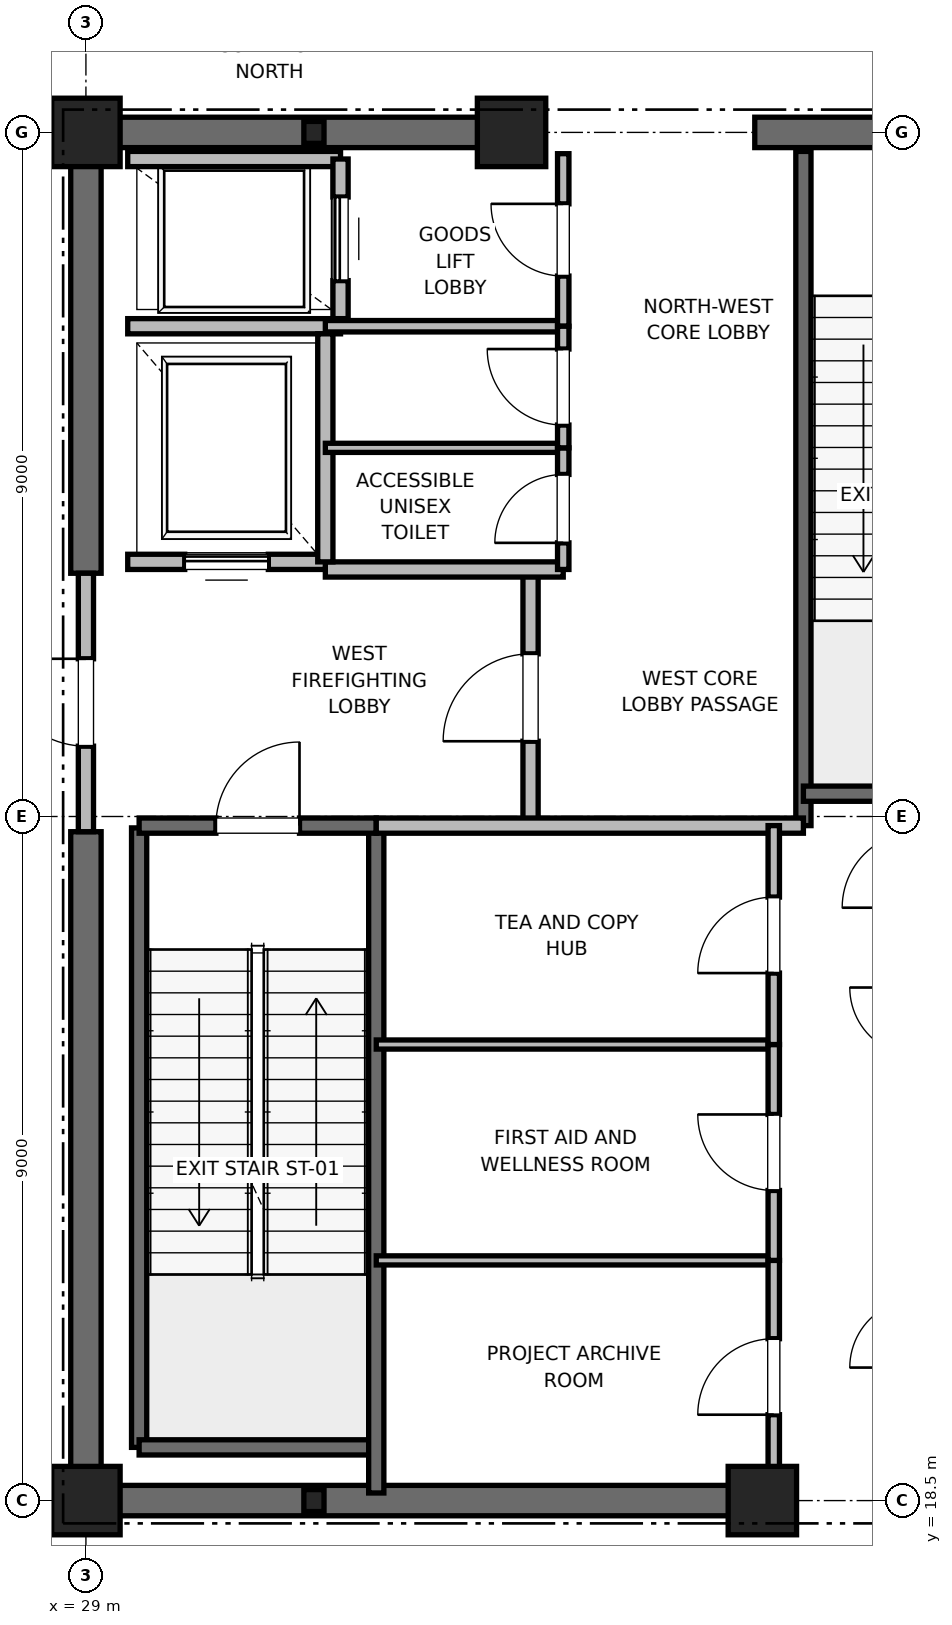
"""IFC4 building model, lengths in metres.
Left out: names, types, materials, properties, quantities, classifications, styles, units other than length and angle.
Written with IfcOpenShell. Run it as: python <this file> out.ifc"""

import sys

from ifc_helpers import new_model, si_unit, direction, frame, frame_2d, origin, origin_2d, place, context, subcontext, project, spatial, rectangle, i_section, extrude, element, fill, save


model = new_model("IFC4")
c1 = context("Model", 3, precision=1e-05, world=origin(), true_north=direction((0.0, 1.0)))
c2 = subcontext(c1, "Body", "Model", "MODEL_VIEW")
j1 = project(units=[si_unit("LENGTHUNIT", "METRE"), si_unit("PLANEANGLEUNIT", "RADIAN")], contexts=[c1])
p1 = place(None, origin())
s1 = spatial("IfcSite", under=j1, at=p1, CompositionType="ELEMENT")
p2 = place(p1, origin())
s2 = spatial("IfcBuilding", under=s1, at=p2, CompositionType="ELEMENT")
p3 = place(p2, frame((0.0, 0.0, 348.8)))
s3 = spatial("IfcBuildingStorey", under=s2, at=p3, CompositionType="ELEMENT", Elevation=348.8)
for number, where, z_axis, x_axis in (
    (1, (29.0, 18.5, 0.0), (0.0, 0.0, 1.0), (1.0, 0.0, 0.0)),
    (2, (29.0, 36.5, 0.0), (0.0, 0.0, 1.0), (1.0, 0.0, 0.0)),
    (3, (37.9, 18.5, 0.0), (0.0, 0.0, 1.0), (1.0, 0.0, 0.0)),
    (4, (34.6, 36.5, 0.0), (0.0, 0.0, 1.0), (1.0, 0.0, 0.0)),
):
    element("IfcColumn", number, at=place(p3, frame(where, z_axis=z_axis, x_axis=x_axis)), inside=s3, PredefinedType="PILASTER", context=c2, shape_type="SweptSolid", body=[
        extrude(rectangle(XDim=0.9, YDim=0.9, at=origin_2d()), origin(), (0.0, 0.0, 1.0), 5.5),
    ])
for number, where, z_axis, x_axis in (
    (5, (32.0, 18.5, 0.0), (0.0, 0.0, 1.0), (1.0, 0.0, 0.0)),
    (6, (32.0, 36.5, 0.0), (0.0, 0.0, 1.0), (1.0, 0.0, 0.0)),
):
    element("IfcColumn", number, at=place(p3, frame(where, z_axis=z_axis, x_axis=x_axis)), inside=s3, PredefinedType="COLUMN", context=c2, shape_type="SweptSolid", body=[
        extrude(i_section(OverallWidth=0.265, OverallDepth=0.289, WebThickness=0.019, FlangeThickness=0.032, FilletRadius=0.013, at=origin_2d()), origin(), (0.0, 0.0, 1.0), 5.5),
    ])
p4 = place(p3, frame((29.0, 18.5, 0.0), z_axis=(0.0, 0.0, 1.0), x_axis=(1.0, 0.0, 0.0)))
e7 = element("IfcWall", 7, at=p4, inside=s3, PredefinedType="SHEAR", context=c2, shape_type="SweptSolid", body=[
    extrude(rectangle(XDim=9.2, YDim=0.4, at=frame_2d((4.6, 0.0))), origin(), (0.0, 0.0, 1.0), 5.2),
])
p5 = place(p3, frame((29.0, 36.5, 0.0), z_axis=(0.0, 0.0, 1.0), x_axis=(1.0, 0.0, 0.0)))
e8 = element("IfcWall", 8, at=p5, inside=s3, PredefinedType="SHEAR", context=c2, shape_type="SweptSolid", body=[
    extrude(rectangle(XDim=5.8, YDim=0.4, at=frame_2d((2.9, 0.0))), origin(), (0.0, 0.0, 1.0), 5.2),
])
p6 = place(p3, frame((37.8, 36.5, 0.0), z_axis=(0.0, 0.0, 1.0), x_axis=(1.0, 0.0, 0.0)))
e9 = element("IfcWall", 9, at=p6, inside=s3, PredefinedType="SHEAR", context=c2, shape_type="SweptSolid", body=[
    extrude(rectangle(XDim=4.4, YDim=0.4, at=frame_2d((2.2, 0.0))), origin(), (0.0, 0.0, 1.0), 5.2),
])
p7 = place(p6, frame((1.65, 0.0, 0.0)))
e10 = element("IfcOpeningElement", 10, at=p7, cuts=e9, PredefinedType="OPENING", context=c2, shape_type="SweptSolid", body=[
    extrude(rectangle(XDim=1.1, YDim=2.15, at=frame_2d((0.55, 1.075))), frame((0.0, 0.2, 0.0), z_axis=(0.0, -1.0, 0.0), x_axis=(1.0, 0.0, 0.0)), (0.0, 0.0, 1.0), 0.4),
])
p8 = place(p3, frame((29.0, 18.5, 0.0), z_axis=(0.0, 0.0, 1.0), x_axis=(0.0, 1.0, 0.0)))
e11 = element("IfcWall", 11, at=p8, inside=s3, PredefinedType="SHEAR", context=c2, shape_type="SweptSolid", body=[
    extrude(rectangle(XDim=8.8, YDim=0.4, at=frame_2d((4.4, 0.0))), origin(), (0.0, 0.0, 1.0), 5.2),
])
p9 = place(p3, frame((29.0, 30.7, 0.0), z_axis=(0.0, 0.0, 1.0), x_axis=(0.0, 1.0, 0.0)))
e12 = element("IfcWall", 12, at=p9, inside=s3, PredefinedType="SHEAR", context=c2, shape_type="SweptSolid", body=[
    extrude(rectangle(XDim=5.8, YDim=0.4, at=frame_2d((2.9, 0.0))), origin(), (0.0, 0.0, 1.0), 5.2),
])
p10 = place(p3, frame((29.7, 19.2, 0.0), z_axis=(0.0, 0.0, 1.0), x_axis=(0.0, 1.0, 0.0)))
e13 = element("IfcWall", 13, at=p10, inside=s3, PredefinedType="SOLIDWALL", context=c2, shape_type="SweptSolid", body=[
    extrude(rectangle(XDim=8.15, YDim=0.2, at=frame_2d((4.075, 0.0))), origin(), (0.0, 0.0, 1.0), 5.2),
])
p11 = place(p3, frame((29.7, 19.2, 0.0), z_axis=(0.0, 0.0, 1.0), x_axis=(1.0, 0.0, 0.0)))
e14 = element("IfcWall", 14, at=p11, inside=s3, PredefinedType="SOLIDWALL", context=c2, shape_type="SweptSolid", body=[
    extrude(rectangle(XDim=3.12, YDim=0.2, at=frame_2d((1.56, 0.0))), origin(), (0.0, 0.0, 1.0), 5.2),
])
p12 = place(p3, frame((32.82, 18.6, 0.0), z_axis=(0.0, 0.0, 1.0), x_axis=(0.0, 1.0, 0.0)))
e15 = element("IfcWall", 15, at=p12, inside=s3, PredefinedType="SOLIDWALL", context=c2, shape_type="SweptSolid", body=[
    extrude(rectangle(XDim=8.78, YDim=0.2, at=frame_2d((4.39, 0.0))), origin(), (0.0, 0.0, 1.0), 5.2),
])
p13 = place(p3, frame((29.7, 27.38, 0.0), z_axis=(0.0, 0.0, 1.0), x_axis=(1.0, 0.0, 0.0)))
e16 = element("IfcWall", 16, at=p13, inside=s3, PredefinedType="SOLIDWALL", context=c2, shape_type="SweptSolid", body=[
    extrude(rectangle(XDim=3.12, YDim=0.2, at=frame_2d((1.56, 0.0))), origin(), (0.0, 0.0, 1.0), 5.2),
])
p14 = place(p13, frame((1.01, 0.0, 0.0)))
e17 = element("IfcOpeningElement", 17, at=p14, cuts=e16, PredefinedType="OPENING", context=c2, shape_type="SweptSolid", body=[
    extrude(rectangle(XDim=1.1, YDim=2.15, at=frame_2d((0.55, 1.075))), frame((0.0, 0.1, 0.0), z_axis=(0.0, -1.0, 0.0), x_axis=(1.0, 0.0, 0.0)), (0.0, 0.0, 1.0), 0.2),
])
p15 = place(p3, frame((38.44, 27.38, 0.0), z_axis=(0.0, 0.0, 1.0), x_axis=(0.0, 1.0, 0.0)))
e18 = element("IfcWall", 18, at=p15, inside=s3, PredefinedType="SOLIDWALL", context=c2, shape_type="SweptSolid", body=[
    extrude(rectangle(XDim=8.87, YDim=0.2, at=frame_2d((4.435, 0.0))), origin(), (0.0, 0.0, 1.0), 5.2),
])
p16 = place(p3, frame((38.44, 27.8, 0.0), z_axis=(0.0, 0.0, 1.0), x_axis=(1.0, 0.0, 0.0)))
e19 = element("IfcWall", 19, at=p16, inside=s3, PredefinedType="SOLIDWALL", context=c2, shape_type="SweptSolid", body=[
    extrude(rectangle(XDim=3.32, YDim=0.2, at=frame_2d((1.66, 0.0))), origin(), (0.0, 0.0, 1.0), 5.2),
])
p17 = place(p3, frame((34.85, 27.38, 0.0), z_axis=(0.0, 0.0, 1.0), x_axis=(0.0, 1.0, 0.0)))
e20 = element("IfcWall", 20, at=p17, inside=s3, PredefinedType="PARTITIONING", context=c2, shape_type="SweptSolid", body=[
    extrude(rectangle(XDim=3.37, YDim=0.2, at=frame_2d((1.685, 0.0))), origin(), (0.0, 0.0, 1.0), 5.2),
])
p18 = place(p17, frame((1.11, 0.0, 0.0)))
e21 = element("IfcOpeningElement", 21, at=p18, cuts=e20, PredefinedType="OPENING", context=c2, shape_type="SweptSolid", body=[
    extrude(rectangle(XDim=1.15, YDim=2.2, at=frame_2d((0.575, 1.1))), frame((0.0, 0.1, 0.0), z_axis=(0.0, -1.0, 0.0), x_axis=(1.0, 0.0, 0.0)), (0.0, 0.0, 1.0), 0.2),
])
p19 = place(p3, frame((29.0, 27.3, 0.0), z_axis=(0.0, 0.0, 1.0), x_axis=(0.0, 1.0, 0.0)))
e22 = element("IfcWall", 22, at=p19, inside=s3, PredefinedType="PARTITIONING", context=c2, shape_type="SweptSolid", body=[
    extrude(rectangle(XDim=3.4, YDim=0.2, at=frame_2d((1.7, 0.0))), origin(), (0.0, 0.0, 1.0), 4.28),
])
p20 = place(p19, frame((1.125, 0.0, 0.0)))
e23 = element("IfcOpeningElement", 23, at=p20, cuts=e22, PredefinedType="OPENING", context=c2, shape_type="SweptSolid", body=[
    extrude(rectangle(XDim=1.15, YDim=2.2, at=frame_2d((0.575, 1.1))), frame((0.0, 0.1, 0.0), z_axis=(0.0, -1.0, 0.0), x_axis=(1.0, 0.0, 0.0)), (0.0, 0.0, 1.0), 0.2),
])
p21 = place(p3, frame((32.82, 27.38, 0.0), z_axis=(0.0, 0.0, 1.0), x_axis=(1.0, 0.0, 0.0)))
e24 = element("IfcWall", 24, at=p21, inside=s3, PredefinedType="PARTITIONING", context=c2, shape_type="SweptSolid", body=[
    extrude(rectangle(XDim=5.62, YDim=0.2, at=frame_2d((2.81, 0.0))), origin(), (0.0, 0.0, 1.0), 5.2),
])
p22 = place(p3, frame((32.15, 30.75, 0.0), z_axis=(0.0, 0.0, 1.0), x_axis=(1.0, 0.0, 0.0)))
e25 = element("IfcWall", 25, at=p22, inside=s3, PredefinedType="PARTITIONING", context=c2, shape_type="SweptSolid", body=[
    extrude(rectangle(XDim=3.13, YDim=0.2, at=frame_2d((1.565, 0.0))), origin(), (0.0, 0.0, 1.0), 5.2),
])
p23 = place(p3, frame((29.55, 30.85, 0.0), z_axis=(0.0, 0.0, 1.0), x_axis=(1.0, 0.0, 0.0)))
e26 = element("IfcWall", 26, at=p23, inside=s3, PredefinedType="SOLIDWALL", context=c2, shape_type="SweptSolid", body=[
    extrude(rectangle(XDim=2.6, YDim=0.2, at=frame_2d((1.3, 0.0))), origin(), (0.0, 0.0, 1.0), 4.28),
])
p24 = place(p23, frame((0.75, 0.0, 0.0)))
e27 = element("IfcOpeningElement", 27, at=p24, cuts=e26, PredefinedType="OPENING", context=c2, shape_type="SweptSolid", body=[
    extrude(rectangle(XDim=1.1, YDim=2.2, at=frame_2d((0.55, 1.1))), frame((0.0, 0.1, 0.0), z_axis=(0.0, -1.0, 0.0), x_axis=(1.0, 0.0, 0.0)), (0.0, 0.0, 1.0), 0.2),
])
p25 = place(p3, frame((29.55, 33.95, 0.0), z_axis=(0.0, 0.0, 1.0), x_axis=(1.0, 0.0, 0.0)))
e28 = element("IfcWall", 28, at=p25, inside=s3, PredefinedType="SOLIDWALL", context=c2, shape_type="SweptSolid", body=[
    extrude(rectangle(XDim=2.8, YDim=0.2, at=frame_2d((1.4, 0.0))), origin(), (0.0, 0.0, 1.0), 5.2),
])
p26 = place(p3, frame((32.15, 30.85, 0.0), z_axis=(0.0, 0.0, 1.0), x_axis=(0.0, 1.0, 0.0)))
e29 = element("IfcWall", 29, at=p26, inside=s3, PredefinedType="SOLIDWALL", context=c2, shape_type="SweptSolid", body=[
    extrude(rectangle(XDim=3.0, YDim=0.2, at=frame_2d((1.5, 0.0))), origin(), (0.0, 0.0, 1.0), 5.2),
])
p27 = place(p3, frame((32.35, 36.15, 0.0), z_axis=(0.0, 0.0, 1.0), x_axis=(-1.0, 0.0, 0.0)))
e30 = element("IfcWall", 30, at=p27, inside=s3, PredefinedType="SOLIDWALL", context=c2, shape_type="SweptSolid", body=[
    extrude(rectangle(XDim=2.8, YDim=0.2, at=frame_2d((1.4, 0.0))), origin(), (0.0, 0.0, 1.0), 4.635),
])
p28 = place(p3, frame((32.35, 34.05, 0.0), z_axis=(0.0, 0.0, 1.0), x_axis=(0.0, 1.0, 0.0)))
e31 = element("IfcWall", 31, at=p28, inside=s3, PredefinedType="SOLIDWALL", context=c2, shape_type="SweptSolid", body=[
    extrude(rectangle(XDim=2.1, YDim=0.2, at=frame_2d((1.05, 0.0))), origin(), (0.0, 0.0, 1.0), 5.2),
])
p29 = place(p28, frame((0.5, 0.0, 0.0)))
e32 = element("IfcOpeningElement", 32, at=p29, cuts=e31, PredefinedType="OPENING", context=c2, shape_type="SweptSolid", body=[
    extrude(rectangle(XDim=1.1, YDim=2.2, at=frame_2d((0.55, 1.1))), frame((0.0, 0.1, 0.0), z_axis=(0.0, -1.0, 0.0), x_axis=(1.0, 0.0, 0.0)), (0.0, 0.0, 1.0), 0.2),
])
p30 = place(p3, frame((32.15, 33.95, 0.0), z_axis=(0.0, 0.0, 1.0), x_axis=(1.0, 0.0, 0.0)))
e33 = element("IfcWall", 33, at=p30, inside=s3, PredefinedType="PARTITIONING", context=c2, shape_type="SweptSolid", body=[
    extrude(rectangle(XDim=3.13, YDim=0.15, at=frame_2d((1.565, 0.0))), origin(), (0.0, 0.0, 1.0), 2.85),
])
p31 = place(p3, frame((35.28, 33.95, 0.0), z_axis=(0.0, 0.0, 1.0), x_axis=(0.0, 1.0, 0.0)))
e34 = element("IfcWall", 34, at=p31, inside=s3, PredefinedType="PARTITIONING", context=c2, shape_type="SweptSolid", body=[
    extrude(rectangle(XDim=2.27, YDim=0.15, at=frame_2d((1.135, 0.0))), origin(), (0.0, 0.0, 1.0), 2.85),
])
p32 = place(p31, frame((0.66, 0.0, 0.0)))
e35 = element("IfcOpeningElement", 35, at=p32, cuts=e34, PredefinedType="OPENING", context=c2, shape_type="SweptSolid", body=[
    extrude(rectangle(XDim=0.95, YDim=2.15, at=frame_2d((0.475, 1.075))), frame((0.0, 0.075, 0.0), z_axis=(0.0, -1.0, 0.0), x_axis=(1.0, 0.0, 0.0)), (0.0, 0.0, 1.0), 0.15),
])
p33 = place(p3, frame((32.15, 32.35, 0.0), z_axis=(0.0, 0.0, 1.0), x_axis=(1.0, 0.0, 0.0)))
e36 = element("IfcWall", 36, at=p33, inside=s3, PredefinedType="PARTITIONING", context=c2, shape_type="SweptSolid", body=[
    extrude(rectangle(XDim=3.13, YDim=0.12, at=frame_2d((1.565, 0.0))), origin(), (0.0, 0.0, 1.0), 2.85),
])
p34 = place(p3, frame((35.28, 30.75, 0.0), z_axis=(0.0, 0.0, 1.0), x_axis=(0.0, 1.0, 0.0)))
e37 = element("IfcWall", 37, at=p34, inside=s3, PredefinedType="PARTITIONING", context=c2, shape_type="SweptSolid", body=[
    extrude(rectangle(XDim=1.6, YDim=0.15, at=frame_2d((0.8, 0.0))), origin(), (0.0, 0.0, 1.0), 2.85),
])
p35 = place(p34, frame((0.35, 0.0, 0.0)))
e38 = element("IfcOpeningElement", 38, at=p35, cuts=e37, PredefinedType="OPENING", context=c2, shape_type="SweptSolid", body=[
    extrude(rectangle(XDim=0.9, YDim=2.1, at=frame_2d((0.45, 1.05))), frame((0.0, 0.075, 0.0), z_axis=(0.0, -1.0, 0.0), x_axis=(1.0, 0.0, 0.0)), (0.0, 0.0, 1.0), 0.15),
])
p36 = place(p3, frame((35.28, 32.35, 0.0), z_axis=(0.0, 0.0, 1.0), x_axis=(0.0, 1.0, 0.0)))
e39 = element("IfcWall", 39, at=p36, inside=s3, PredefinedType="PARTITIONING", context=c2, shape_type="SweptSolid", body=[
    extrude(rectangle(XDim=1.6, YDim=0.15, at=frame_2d((0.8, 0.0))), origin(), (0.0, 0.0, 1.0), 2.85),
])
p37 = place(p36, frame((0.3, 0.0, 0.0)))
e40 = element("IfcOpeningElement", 40, at=p37, cuts=e39, PredefinedType="OPENING", context=c2, shape_type="SweptSolid", body=[
    extrude(rectangle(XDim=1.0, YDim=2.15, at=frame_2d((0.5, 1.075))), frame((0.0, 0.075, 0.0), z_axis=(0.0, -1.0, 0.0), x_axis=(1.0, 0.0, 0.0)), (0.0, 0.0, 1.0), 0.15),
])
for number, where, z_axis, x_axis in (
    (41, (32.82, 21.66, 0.0), (0.0, 0.0, 1.0), (1.0, 0.0, 0.0)),
    (42, (32.82, 24.5, 0.0), (0.0, 0.0, 1.0), (1.0, 0.0, 0.0)),
):
    element("IfcWall", number, at=place(p3, frame(where, z_axis=z_axis, x_axis=x_axis)), inside=s3, PredefinedType="PARTITIONING", context=c2, shape_type="SweptSolid", body=[
        extrude(rectangle(XDim=5.23, YDim=0.12, at=frame_2d((2.615, 0.0))), origin(), (0.0, 0.0, 1.0), 2.85),
    ])
p38 = place(p3, frame((38.05, 18.6, 0.0), z_axis=(0.0, 0.0, 1.0), x_axis=(0.0, 1.0, 0.0)))
e43 = element("IfcWall", 43, at=p38, inside=s3, PredefinedType="PARTITIONING", context=c2, shape_type="SweptSolid", body=[
    extrude(rectangle(XDim=3.06, YDim=0.15, at=frame_2d((1.53, 0.0))), origin(), (0.0, 0.0, 1.0), 2.85),
])
p39 = place(p38, frame((1.03, 0.0, 0.0)))
e44 = element("IfcOpeningElement", 44, at=p39, cuts=e43, PredefinedType="OPENING", context=c2, shape_type="SweptSolid", body=[
    extrude(rectangle(XDim=1.0, YDim=2.15, at=frame_2d((0.5, 1.075))), frame((0.0, 0.075, 0.0), z_axis=(0.0, -1.0, 0.0), x_axis=(1.0, 0.0, 0.0)), (0.0, 0.0, 1.0), 0.15),
])
p40 = place(p3, frame((38.05, 21.66, 0.0), z_axis=(0.0, 0.0, 1.0), x_axis=(0.0, 1.0, 0.0)))
e45 = element("IfcWall", 45, at=p40, inside=s3, PredefinedType="PARTITIONING", context=c2, shape_type="SweptSolid", body=[
    extrude(rectangle(XDim=2.84, YDim=0.15, at=frame_2d((1.42, 0.0))), origin(), (0.0, 0.0, 1.0), 2.85),
])
p41 = place(p40, frame((0.92, 0.0, 0.0)))
e46 = element("IfcOpeningElement", 46, at=p41, cuts=e45, PredefinedType="OPENING", context=c2, shape_type="SweptSolid", body=[
    extrude(rectangle(XDim=1.0, YDim=2.15, at=frame_2d((0.5, 1.075))), frame((0.0, 0.075, 0.0), z_axis=(0.0, -1.0, 0.0), x_axis=(1.0, 0.0, 0.0)), (0.0, 0.0, 1.0), 0.15),
])
p42 = place(p3, frame((38.05, 24.5, 0.0), z_axis=(0.0, 0.0, 1.0), x_axis=(0.0, 1.0, 0.0)))
e47 = element("IfcWall", 47, at=p42, inside=s3, PredefinedType="PARTITIONING", context=c2, shape_type="SweptSolid", body=[
    extrude(rectangle(XDim=2.88, YDim=0.15, at=frame_2d((1.44, 0.0))), origin(), (0.0, 0.0, 1.0), 2.85),
])
p43 = place(p42, frame((0.94, 0.0, 0.0)))
e48 = element("IfcOpeningElement", 48, at=p43, cuts=e47, PredefinedType="OPENING", context=c2, shape_type="SweptSolid", body=[
    extrude(rectangle(XDim=1.0, YDim=2.15, at=frame_2d((0.5, 1.075))), frame((0.0, 0.075, 0.0), z_axis=(0.0, -1.0, 0.0), x_axis=(1.0, 0.0, 0.0)), (0.0, 0.0, 1.0), 0.15),
])
p44 = place(p14, origin())
e49 = element("IfcDoor", 49, at=p44, inside=s3, OperationType="SINGLE_SWING_RIGHT", PredefinedType="DOOR", context=c2, shape_type="SweptSolid", body=[
    extrude(rectangle(XDim=1.1, YDim=2.15, at=frame_2d((0.55, 1.075))), frame((0.0, 0.025, 0.0), z_axis=(0.0, -1.0, 0.0), x_axis=(1.0, 0.0, 0.0)), (0.0, 0.0, 1.0), 0.05),
])
fill(e17, e49)
p45 = place(p18, origin())
e50 = element("IfcDoor", 50, at=p45, inside=s3, OperationType="SINGLE_SWING_LEFT", PredefinedType="DOOR", context=c2, shape_type="SweptSolid", body=[
    extrude(rectangle(XDim=1.15, YDim=2.2, at=frame_2d((0.575, 1.1))), frame((0.0, 0.025, 0.0), z_axis=(0.0, -1.0, 0.0), x_axis=(1.0, 0.0, 0.0)), (0.0, 0.0, 1.0), 0.05),
])
fill(e21, e50)
p46 = place(p20, origin())
e51 = element("IfcDoor", 51, at=p46, inside=s3, OperationType="SINGLE_SWING_RIGHT", PredefinedType="DOOR", context=c2, shape_type="SweptSolid", body=[
    extrude(rectangle(XDim=1.15, YDim=2.2, at=frame_2d((0.575, 1.1))), frame((0.0, 0.025, 0.0), z_axis=(0.0, -1.0, 0.0), x_axis=(1.0, 0.0, 0.0)), (0.0, 0.0, 1.0), 0.05),
])
fill(e23, e51)
p47 = place(p24, origin())
e52 = element("IfcDoor", 52, at=p47, inside=s3, OperationType="SLIDING_TO_RIGHT", PredefinedType="DOOR", context=c2, shape_type="SweptSolid", body=[
    extrude(rectangle(XDim=1.1, YDim=2.2, at=frame_2d((0.55, 1.1))), frame((0.0, 0.025, 0.0), z_axis=(0.0, -1.0, 0.0), x_axis=(1.0, 0.0, 0.0)), (0.0, 0.0, 1.0), 0.05),
])
fill(e27, e52)
p48 = place(p29, origin())
e53 = element("IfcDoor", 53, at=p48, inside=s3, OperationType="SLIDING_TO_RIGHT", PredefinedType="DOOR", context=c2, shape_type="SweptSolid", body=[
    extrude(rectangle(XDim=1.1, YDim=2.2, at=frame_2d((0.55, 1.1))), frame((0.0, 0.025, 0.0), z_axis=(0.0, -1.0, 0.0), x_axis=(1.0, 0.0, 0.0)), (0.0, 0.0, 1.0), 0.05),
])
fill(e32, e53)
p49 = place(p32, origin())
e54 = element("IfcDoor", 54, at=p49, inside=s3, OperationType="SINGLE_SWING_RIGHT", PredefinedType="DOOR", context=c2, shape_type="SweptSolid", body=[
    extrude(rectangle(XDim=0.95, YDim=2.15, at=frame_2d((0.475, 1.075))), frame((0.0, 0.025, 0.0), z_axis=(0.0, -1.0, 0.0), x_axis=(1.0, 0.0, 0.0)), (0.0, 0.0, 1.0), 0.05),
])
fill(e35, e54)
p50 = place(p35, origin())
e55 = element("IfcDoor", 55, at=p50, inside=s3, OperationType="SINGLE_SWING_LEFT", PredefinedType="DOOR", context=c2, shape_type="SweptSolid", body=[
    extrude(rectangle(XDim=0.9, YDim=2.1, at=frame_2d((0.45, 1.05))), frame((0.0, 0.025, 0.0), z_axis=(0.0, -1.0, 0.0), x_axis=(1.0, 0.0, 0.0)), (0.0, 0.0, 1.0), 0.05),
])
fill(e38, e55)
p51 = place(p37, origin())
e56 = element("IfcDoor", 56, at=p51, inside=s3, OperationType="SINGLE_SWING_RIGHT", PredefinedType="DOOR", context=c2, shape_type="SweptSolid", body=[
    extrude(rectangle(XDim=1.0, YDim=2.15, at=frame_2d((0.5, 1.075))), frame((0.0, 0.025, 0.0), z_axis=(0.0, -1.0, 0.0), x_axis=(1.0, 0.0, 0.0)), (0.0, 0.0, 1.0), 0.05),
])
fill(e40, e56)
p52 = place(p39, origin())
e57 = element("IfcDoor", 57, at=p52, inside=s3, OperationType="SINGLE_SWING_LEFT", PredefinedType="DOOR", context=c2, shape_type="SweptSolid", body=[
    extrude(rectangle(XDim=1.0, YDim=2.15, at=frame_2d((0.5, 1.075))), frame((0.0, 0.025, 0.0), z_axis=(0.0, -1.0, 0.0), x_axis=(1.0, 0.0, 0.0)), (0.0, 0.0, 1.0), 0.05),
])
fill(e44, e57)
p53 = place(p41, origin())
e58 = element("IfcDoor", 58, at=p53, inside=s3, OperationType="SINGLE_SWING_RIGHT", PredefinedType="DOOR", context=c2, shape_type="SweptSolid", body=[
    extrude(rectangle(XDim=1.0, YDim=2.15, at=frame_2d((0.5, 1.075))), frame((0.0, 0.025, 0.0), z_axis=(0.0, -1.0, 0.0), x_axis=(1.0, 0.0, 0.0)), (0.0, 0.0, 1.0), 0.05),
])
fill(e46, e58)
p54 = place(p43, origin())
e59 = element("IfcDoor", 59, at=p54, inside=s3, OperationType="SINGLE_SWING_LEFT", PredefinedType="DOOR", context=c2, shape_type="SweptSolid", body=[
    extrude(rectangle(XDim=1.0, YDim=2.15, at=frame_2d((0.5, 1.075))), frame((0.0, 0.025, 0.0), z_axis=(0.0, -1.0, 0.0), x_axis=(1.0, 0.0, 0.0)), (0.0, 0.0, 1.0), 0.05),
])
fill(e48, e59)
save(model, sys.argv[1])
